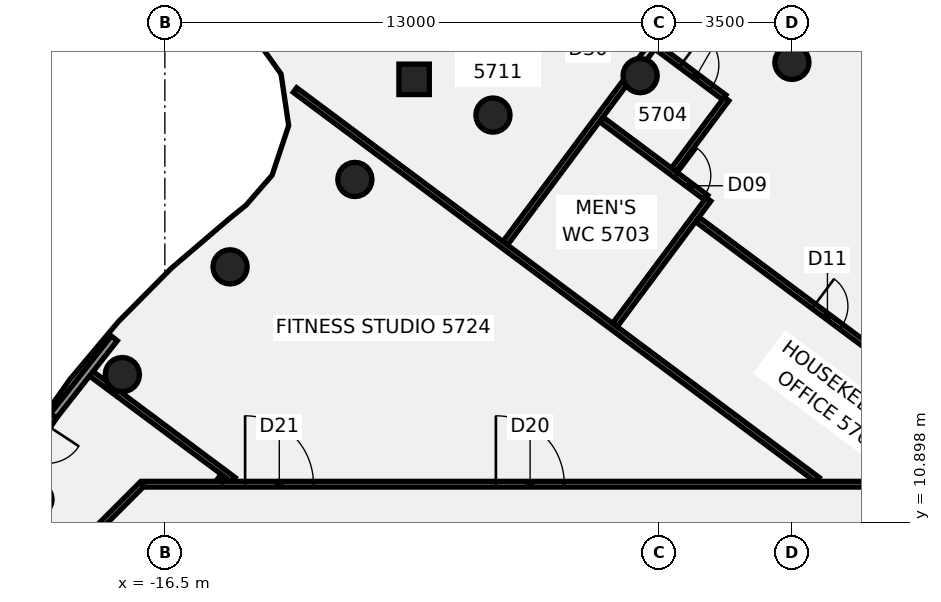
"""IFC4 building model, lengths in metres.
Left out: names, types, materials, properties, quantities, classifications, styles, units other than length and angle.
Written with IfcOpenShell. Run it as: python <this file> out.ifc"""

import sys

from ifc_helpers import new_model, si_unit, direction, frame, frame_2d, origin, origin_2d, place, context, subcontext, project, spatial, rectangle, circle, extrude, element, fill, save


model = new_model("IFC4")
c1 = context("Model", 3, precision=1e-05, world=origin(), true_north=direction((0.0, 1.0)))
c2 = subcontext(c1, "Body", "Model", "MODEL_VIEW")
j1 = project(units=[si_unit("LENGTHUNIT", "METRE"), si_unit("PLANEANGLEUNIT", "RADIAN")], contexts=[c1])
p1 = place(None, origin())
s1 = spatial("IfcSite", under=j1, at=p1, CompositionType="ELEMENT")
p2 = place(p1, origin())
s2 = spatial("IfcBuilding", under=s1, at=p2, CompositionType="ELEMENT")
p3 = place(p2, frame((0.0, 0.0, 227.1)))
s3 = spatial("IfcBuildingStorey", under=s2, at=p3, CompositionType="ELEMENT", Elevation=227.1)
for number, where, z_axis, x_axis in (
    (1, (0.0, 23.0, -0.14), (0.0, 0.0, 1.0), (1.0, 0.0, 0.0)),
    (2, (-3.994, 22.651, -0.14), (0.0, 0.0, 1.0), (1.0, 0.0, 0.0)),
    (3, (-7.866, 21.613, -0.14), (0.0, 0.0, 1.0), (1.0, 0.0, 0.0)),
    (4, (-11.5, 19.919, -0.14), (0.0, 0.0, 1.0), (1.0, 0.0, 0.0)),
    (5, (-14.784, 17.619, -0.14), (0.0, 0.0, 1.0), (1.0, 0.0, 0.0)),
    (6, (-17.619, 14.784, -0.14), (0.0, 0.0, 1.0), (1.0, 0.0, 0.0)),
):
    element("IfcColumn", number, at=place(p3, frame(where, z_axis=z_axis, x_axis=x_axis)), inside=s3, PredefinedType="COLUMN", context=c2, shape_type="SweptSolid", body=[
        extrude(circle(Radius=0.45, at=origin_2d()), origin(), (0.0, 0.0, 1.0), 3.6),
    ])
p4 = place(p3, frame((-9.942, 22.553, -0.139), z_axis=(-0.002304349187, -0.050289032263, 0.998732047753), x_axis=(0.597247430318, 0.800971813174, 0.041709249322)))
e7 = element("IfcColumn", 7, at=p4, inside=s3, PredefinedType="COLUMN", context=c2, shape_type="SweptSolid", body=[
    extrude(rectangle(XDim=0.8, YDim=0.8, at=origin_2d()), origin(), (0.0, 0.0, 1.0), 3.602),
])
p5 = place(p3, frame((-18.463, 14.827, 0.0), z_axis=(0.0, 0.0, 1.0), x_axis=(0.801555334436, -0.597920601617, 0.0)))
e8 = element("IfcWall", 8, at=p5, inside=s3, PredefinedType="PARTITIONING", context=c2, shape_type="SweptSolid", body=[
    extrude(rectangle(XDim=4.701, YDim=0.15, at=frame_2d((2.351, 0.0))), origin(), (0.0, 0.0, 1.0), 2.864),
])
p6 = place(p3, frame((-13.076, 22.271, 0.0), z_axis=(0.0, 0.0, 1.0), x_axis=(0.801609439626, -0.597848062891, 0.0)))
e9 = element("IfcWall", 9, at=p6, inside=s3, PredefinedType="PARTITIONING", context=c2, shape_type="SweptSolid", body=[
    extrude(rectangle(XDim=17.153, YDim=0.15, at=frame_2d((8.577, 0.0))), origin(), (0.0, 0.0, 1.0), 2.864),
])
p7 = place(p3, frame((-5.015, 21.498, 0.0), z_axis=(0.0, 0.0, 1.0), x_axis=(0.801666095662, -0.597772089568, 0.0)))
e10 = element("IfcWall", 10, at=p7, inside=s3, PredefinedType="PARTITIONING", context=c2, shape_type="SweptSolid", body=[
    extrude(rectangle(XDim=3.44, YDim=0.15, at=frame_2d((1.72, 0.0))), origin(), (0.0, 0.0, 1.0), 2.864),
])
p8 = place(p7, frame((2.47, 0.0, 0.0)))
e11 = element("IfcOpeningElement", 11, at=p8, cuts=e10, PredefinedType="OPENING", context=c2, shape_type="SweptSolid", body=[
    extrude(rectangle(XDim=0.9, YDim=2.1, at=frame_2d((0.45, 1.05))), frame((0.0, 0.085, 0.0), z_axis=(0.0, -1.0, 0.0), x_axis=(1.0, 0.0, 0.0)), (0.0, 0.0, 1.0), 0.17),
])
p9 = place(p3, frame((-3.564, 23.41, 0.0), z_axis=(0.0, 0.0, 1.0), x_axis=(0.801603412124, -0.59785614463, 0.0)))
e12 = element("IfcWall", 12, at=p9, inside=s3, PredefinedType="PARTITIONING", context=c2, shape_type="SweptSolid", body=[
    extrude(rectangle(XDim=2.225, YDim=0.15, at=frame_2d((1.113, 0.0))), origin(), (0.0, 0.0, 1.0), 2.864),
])
p10 = place(p9, frame((0.8, 0.0, 0.0)))
e13 = element("IfcOpeningElement", 13, at=p10, cuts=e12, PredefinedType="OPENING", context=c2, shape_type="SweptSolid", body=[
    extrude(rectangle(XDim=1.0, YDim=2.1, at=frame_2d((0.5, 1.05))), frame((0.0, 0.085, 0.0), z_axis=(0.0, -1.0, 0.0), x_axis=(1.0, 0.0, 0.0)), (0.0, 0.0, 1.0), 0.17),
])
p11 = place(p3, frame((-2.488, 18.865, 0.0), z_axis=(0.0, 0.0, 1.0), x_axis=(0.801633706651, -0.597815523686, 0.0)))
e14 = element("IfcWall", 14, at=p11, inside=s3, PredefinedType="PARTITIONING", context=c2, shape_type="SweptSolid", body=[
    extrude(rectangle(XDim=11.456, YDim=0.15, at=frame_2d((5.728, 0.0))), origin(), (0.0, 0.0, 1.0), 2.864),
])
p12 = place(p11, frame((3.82, 0.0, 0.0)))
e15 = element("IfcOpeningElement", 15, at=p12, cuts=e14, PredefinedType="OPENING", context=c2, shape_type="SweptSolid", body=[
    extrude(rectangle(XDim=0.9, YDim=2.1, at=frame_2d((0.45, 1.05))), frame((0.0, 0.085, 0.0), z_axis=(0.0, -1.0, 0.0), x_axis=(1.0, 0.0, 0.0)), (0.0, 0.0, 1.0), 0.17),
])
p13 = place(p3, frame((-17.065, 11.9, 0.0), z_axis=(0.0, 0.0, 1.0), x_axis=(1.0, 0.0, 0.0)))
e16 = element("IfcWall", 16, at=p13, inside=s3, PredefinedType="PARTITIONING", context=c2, shape_type="SweptSolid", body=[
    extrude(rectangle(XDim=34.165, YDim=0.15, at=frame_2d((17.083, 0.0))), origin(), (0.0, 0.0, 1.0), 2.864),
])
p14 = place(p13, frame((24.517, 0.0, 0.0)))
e17 = element("IfcOpeningElement", 17, at=p14, cuts=e16, PredefinedType="OPENING", context=c2, shape_type="SweptSolid", body=[
    extrude(rectangle(XDim=1.8, YDim=2.1, at=frame_2d((0.9, 1.05))), frame((0.0, 0.085, 0.0), z_axis=(0.0, -1.0, 0.0), x_axis=(1.0, 0.0, 0.0)), (0.0, 0.0, 1.0), 0.17),
])
p15 = place(p13, frame((9.276, 0.0, 0.0)))
e18 = element("IfcOpeningElement", 18, at=p15, cuts=e16, PredefinedType="OPENING", context=c2, shape_type="SweptSolid", body=[
    extrude(rectangle(XDim=1.8, YDim=2.1, at=frame_2d((0.9, 1.05))), frame((0.0, 0.085, 0.0), z_axis=(0.0, -1.0, 0.0), x_axis=(1.0, 0.0, 0.0)), (0.0, 0.0, 1.0), 0.17),
])
p16 = place(p13, frame((2.676, 0.0, 0.0)))
e19 = element("IfcOpeningElement", 19, at=p16, cuts=e16, PredefinedType="OPENING", context=c2, shape_type="SweptSolid", body=[
    extrude(rectangle(XDim=1.8, YDim=2.1, at=frame_2d((0.9, 1.05))), frame((0.0, 0.085, 0.0), z_axis=(0.0, -1.0, 0.0), x_axis=(1.0, 0.0, 0.0)), (0.0, 0.0, 1.0), 0.17),
])
p17 = place(p3, frame((-18.872, 10.128, 0.0), z_axis=(0.0, 0.0, 1.0), x_axis=(0.707106781187, 0.707106781187, 0.0)))
e20 = element("IfcWall", 20, at=p17, inside=s3, PredefinedType="PARTITIONING", context=c2, shape_type="SweptSolid", body=[
    extrude(rectangle(XDim=2.505, YDim=0.15, at=frame_2d((1.253, 0.0))), origin(), (0.0, 0.0, 1.0), 2.864),
])
p18 = place(p3, frame((-15.047, 12.0, 0.0), z_axis=(0.0, 0.0, 1.0), x_axis=(0.598084412892, 0.801433113276, 0.0)))
e21 = element("IfcWall", 21, at=p18, inside=s3, PredefinedType="PARTITIONING", context=c2, shape_type="SweptSolid", body=[
    extrude(rectangle(XDim=0.143, YDim=0.15, at=frame_2d((0.071, 0.0))), origin(), (0.0, 0.0, 1.0), 2.864),
])
p19 = place(p3, frame((-7.542, 18.243, 0.0), z_axis=(0.0, 0.0, 1.0), x_axis=(0.597845440825, 0.801611395182, 0.0)))
e22 = element("IfcWall", 22, at=p19, inside=s3, PredefinedType="PARTITIONING", context=c2, shape_type="SweptSolid", body=[
    extrude(rectangle(XDim=5.426, YDim=0.15, at=frame_2d((2.713, 0.0))), origin(), (0.0, 0.0, 1.0), 2.864),
])
p20 = place(p3, frame((-4.029, 22.954, 0.0), z_axis=(0.0, 0.0, 1.0), x_axis=(0.597834716072, 0.80161939364, 0.0)))
e23 = element("IfcWall", 23, at=p20, inside=s3, PredefinedType="PARTITIONING", context=c2, shape_type="SweptSolid", body=[
    extrude(rectangle(XDim=8.343, YDim=0.2, at=frame_2d((4.171, 0.0))), origin(), (0.0, 0.0, 1.0), 2.864),
])
p21 = place(p20, frame((0.944, 0.0, 0.0)))
e24 = element("IfcOpeningElement", 24, at=p21, cuts=e23, PredefinedType="OPENING", context=c2, shape_type="SweptSolid", body=[
    extrude(rectangle(XDim=1.4, YDim=2.1, at=frame_2d((0.7, 1.05))), frame((0.0, 0.11, 0.0), z_axis=(0.0, -1.0, 0.0), x_axis=(1.0, 0.0, 0.0)), (0.0, 0.0, 1.0), 0.22),
])
p22 = place(p3, frame((-4.656, 16.091, 0.0), z_axis=(0.0, 0.0, 1.0), x_axis=(0.597779350617, 0.801660681321, 0.0)))
e25 = element("IfcWall", 25, at=p22, inside=s3, PredefinedType="PARTITIONING", context=c2, shape_type="SweptSolid", body=[
    extrude(rectangle(XDim=4.12, YDim=0.15, at=frame_2d((2.06, 0.0))), origin(), (0.0, 0.0, 1.0), 2.864),
])
p23 = place(p3, frame((-3.107, 20.175, 0.0), z_axis=(0.0, 0.0, 1.0), x_axis=(0.59787659673, 0.801588158023, 0.0)))
e26 = element("IfcWall", 26, at=p23, inside=s3, PredefinedType="PARTITIONING", context=c2, shape_type="SweptSolid", body=[
    extrude(rectangle(XDim=2.32, YDim=0.15, at=frame_2d((1.16, 0.0))), origin(), (0.0, 0.0, 1.0), 2.864),
])
p24 = place(p3, frame((-17.831, 15.738, 0.0), z_axis=(0.0, 0.0, 1.0), x_axis=(-0.617667728479, -0.786439175776, 0.0)))
e27 = element("IfcWall", 27, at=p24, inside=s3, PredefinedType="SOLIDWALL", context=c2, shape_type="SweptSolid", body=[
    extrude(rectangle(XDim=2.594, YDim=0.2, at=frame_2d((1.297, 0.0))), origin(), (0.0, 0.0, 1.0), 3.46),
])
p25 = place(p3, frame((-19.433, 13.698, 0.0), z_axis=(0.0, 0.0, 1.0), x_axis=(-0.549473446393, -0.835511179883, 0.0)))
e28 = element("IfcWall", 28, at=p25, inside=s3, PredefinedType="SOLIDWALL", context=c2, shape_type="SweptSolid", body=[
    extrude(rectangle(XDim=1.599, YDim=0.2, at=frame_2d((0.799, 0.0))), origin(), (0.0, 0.0, 1.0), 3.46),
])
p26 = place(p25, frame((0.299, 0.0, 0.0)))
e29 = element("IfcOpeningElement", 29, at=p26, cuts=e28, PredefinedType="OPENING", context=c2, shape_type="SweptSolid", body=[
    extrude(rectangle(XDim=1.0, YDim=2.4, at=frame_2d((0.5, 1.2))), frame((0.0, 0.11, 0.0), z_axis=(0.0, -1.0, 0.0), x_axis=(1.0, 0.0, 0.0)), (0.0, 0.0, 1.0), 0.22),
])
p27 = place(p8, frame((0.9, 0.0, 0.0), z_axis=(0.0, 0.0, 1.0), x_axis=(-1.0, 0.0, 0.0)))
e30 = element("IfcDoor", 30, at=p27, inside=s3, OperationType="SINGLE_SWING_RIGHT", PredefinedType="DOOR", context=c2, shape_type="SweptSolid", body=[
    extrude(rectangle(XDim=0.9, YDim=2.1, at=frame_2d((0.45, 1.05))), frame((0.0, 0.025, 0.0), z_axis=(0.0, -1.0, 0.0), x_axis=(1.0, 0.0, 0.0)), (0.0, 0.0, 1.0), 0.05),
])
fill(e11, e30)
p28 = place(p10, frame((1.0, 0.0, 0.0), z_axis=(0.0, 0.0, 1.0), x_axis=(-1.0, 0.0, 0.0)))
e31 = element("IfcDoor", 31, at=p28, inside=s3, OperationType="SINGLE_SWING_RIGHT", PredefinedType="DOOR", context=c2, shape_type="SweptSolid", body=[
    extrude(rectangle(XDim=1.0, YDim=2.1, at=frame_2d((0.5, 1.05))), frame((0.0, 0.025, 0.0), z_axis=(0.0, -1.0, 0.0), x_axis=(1.0, 0.0, 0.0)), (0.0, 0.0, 1.0), 0.05),
])
fill(e13, e31)
p29 = place(p12, frame((0.9, 0.0, 0.0), z_axis=(0.0, 0.0, 1.0), x_axis=(-1.0, 0.0, 0.0)))
e32 = element("IfcDoor", 32, at=p29, inside=s3, OperationType="SINGLE_SWING_LEFT", PredefinedType="DOOR", context=c2, shape_type="SweptSolid", body=[
    extrude(rectangle(XDim=0.9, YDim=2.1, at=frame_2d((0.45, 1.05))), frame((0.0, 0.025, 0.0), z_axis=(0.0, -1.0, 0.0), x_axis=(1.0, 0.0, 0.0)), (0.0, 0.0, 1.0), 0.05),
])
fill(e15, e32)
p30 = place(p15, origin())
e33 = element("IfcDoor", 33, at=p30, inside=s3, OperationType="DOUBLE_DOOR_SINGLE_SWING", PredefinedType="DOOR", context=c2, shape_type="SweptSolid", body=[
    extrude(rectangle(XDim=1.8, YDim=2.1, at=frame_2d((0.9, 1.05))), frame((0.0, 0.025, 0.0), z_axis=(0.0, -1.0, 0.0), x_axis=(1.0, 0.0, 0.0)), (0.0, 0.0, 1.0), 0.05),
])
fill(e18, e33)
p31 = place(p16, origin())
e34 = element("IfcDoor", 34, at=p31, inside=s3, OperationType="DOUBLE_DOOR_SINGLE_SWING", PredefinedType="DOOR", context=c2, shape_type="SweptSolid", body=[
    extrude(rectangle(XDim=1.8, YDim=2.1, at=frame_2d((0.9, 1.05))), frame((0.0, 0.025, 0.0), z_axis=(0.0, -1.0, 0.0), x_axis=(1.0, 0.0, 0.0)), (0.0, 0.0, 1.0), 0.05),
])
fill(e19, e34)
save(model, sys.argv[1])
